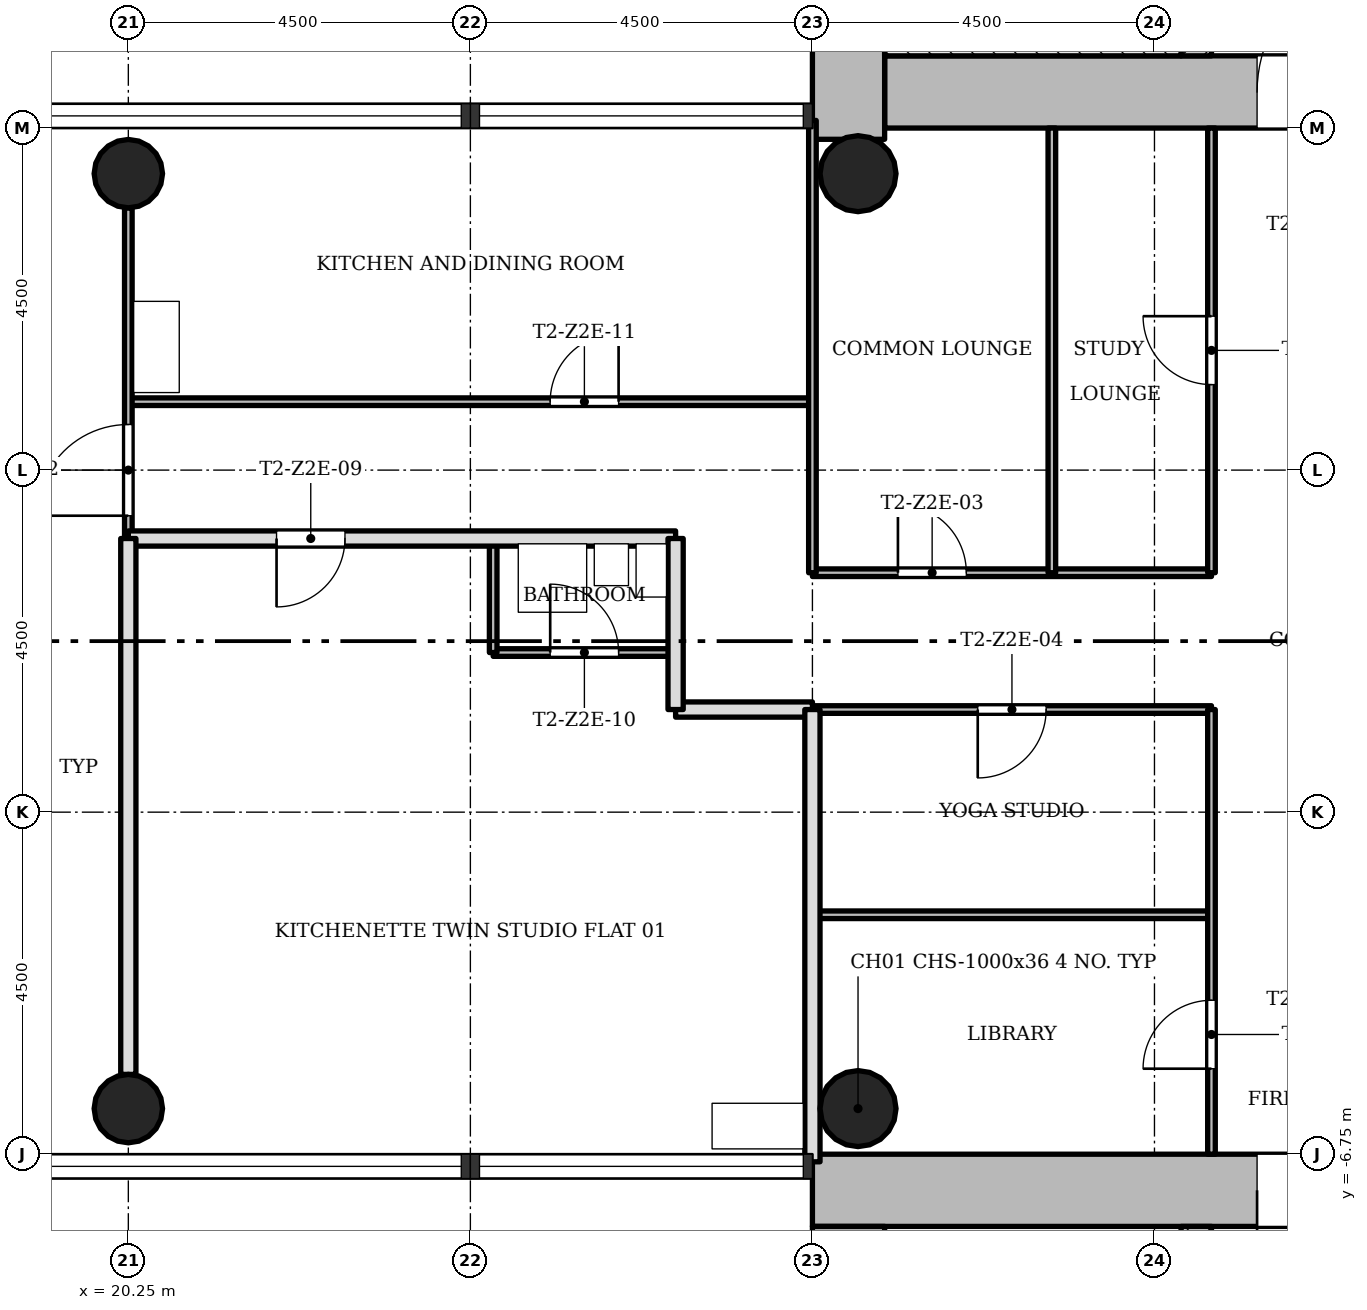
"""IFC4 building model, lengths in metres.
Left out: names, types, materials, properties, quantities, classifications, styles, units other than length and angle.
Written with IfcOpenShell. Run it as: python <this file> out.ifc"""

import sys

from ifc_helpers import new_model, si_unit, direction, frame, frame_2d, origin, origin_2d, place, context, subcontext, project, spatial, rectangle, hollow_circle, extrude, element, fill, save


model = new_model("IFC4")
c1 = context("Model", 3, precision=1e-05, world=origin(), true_north=direction((0.0, 1.0)))
c2 = subcontext(c1, "Body", "Model", "MODEL_VIEW")
j1 = project(units=[si_unit("LENGTHUNIT", "METRE"), si_unit("PLANEANGLEUNIT", "RADIAN")], contexts=[c1])
p1 = place(None, origin())
s1 = spatial("IfcSite", under=j1, at=p1, CompositionType="ELEMENT")
p2 = place(p1, origin())
s2 = spatial("IfcBuilding", under=s1, at=p2, CompositionType="ELEMENT")
p3 = place(p2, frame((0.0, 0.0, 97.0)))
s3 = spatial("IfcBuildingStorey", under=s2, at=p3, CompositionType="ELEMENT", Elevation=97.0)
p4 = place(p3, frame((30.2, 7.225, 0.0), z_axis=(0.0, 0.0, 1.0), x_axis=(1.0, 0.0, 0.0)))
e1 = element("IfcWall", 1, at=p4, inside=s3, PredefinedType="SHEAR", context=c2, shape_type="SweptSolid", body=[
    extrude(rectangle(XDim=12.55, YDim=0.95, at=frame_2d((6.275, 0.0))), origin(), (0.0, 0.0, 1.0), 3.4),
])
p5 = place(p4, frame((4.9, 0.0, 0.0)))
e2 = element("IfcOpeningElement", 2, at=p5, cuts=e1, PredefinedType="OPENING", context=c2, shape_type="SweptSolid", body=[
    extrude(rectangle(XDim=1.8, YDim=2.1, at=frame_2d((0.9, 1.05))), frame((0.0, 0.485, 0.0), z_axis=(0.0, -1.0, 0.0), x_axis=(1.0, 0.0, 0.0)), (0.0, 0.0, 1.0), 0.97),
])
p6 = place(p3, frame((29.725, 15.298, 0.0), z_axis=(0.0, 0.0, 1.0), x_axis=(0.0, -1.0, 0.0)))
e3 = element("IfcWall", 3, at=p6, inside=s3, PredefinedType="SHEAR", context=c2, shape_type="SweptSolid", body=[
    extrude(rectangle(XDim=8.696, YDim=0.95, at=frame_2d((4.348, 0.0))), origin(), (0.0, 0.0, 1.0), 3.4),
])
p7 = place(p3, frame((34.3, 7.7, 0.0), z_axis=(0.0, 0.0, 1.0), x_axis=(0.0, 1.0, 0.0)))
e4 = element("IfcWall", 4, at=p7, inside=s3, PredefinedType="SHEAR", context=c2, shape_type="SweptSolid", body=[
    extrude(rectangle(XDim=7.1, YDim=0.4, at=frame_2d((3.55, 0.0))), origin(), (0.0, 0.0, 1.0), 3.4),
])
p8 = place(p7, frame((0.7, 0.0, 0.0)))
e5 = element("IfcOpeningElement", 5, at=p8, cuts=e4, PredefinedType="OPENING", context=c2, shape_type="SweptSolid", body=[
    extrude(rectangle(XDim=0.9, YDim=2.1, at=frame_2d((0.45, 1.05))), frame((0.0, 0.21, 0.0), z_axis=(0.0, -1.0, 0.0), x_axis=(1.0, 0.0, 0.0)), (0.0, 0.0, 1.0), 0.42),
])
p9 = place(p3, frame((41.8, -7.225, 0.0), z_axis=(0.0, 0.0, 1.0), x_axis=(-1.0, 0.0, 0.0)))
e6 = element("IfcWall", 6, at=p9, inside=s3, PredefinedType="SHEAR", context=c2, shape_type="SweptSolid", body=[
    extrude(rectangle(XDim=12.55, YDim=0.95, at=frame_2d((6.275, 0.0))), origin(), (0.0, 0.0, 1.0), 3.4),
])
p10 = place(p9, frame((4.9, 0.0, 0.0)))
e7 = element("IfcOpeningElement", 7, at=p10, cuts=e6, PredefinedType="OPENING", context=c2, shape_type="SweptSolid", body=[
    extrude(rectangle(XDim=1.8, YDim=2.1, at=frame_2d((0.9, 1.05))), frame((0.0, 0.485, 0.0), z_axis=(0.0, -1.0, 0.0), x_axis=(1.0, 0.0, 0.0)), (0.0, 0.0, 1.0), 0.97),
])
p11 = place(p3, frame((29.725, -7.7, 0.0), z_axis=(0.0, 0.0, 1.0), x_axis=(0.0, -1.0, 0.0)))
e8 = element("IfcWall", 8, at=p11, inside=s3, PredefinedType="SHEAR", context=c2, shape_type="SweptSolid", body=[
    extrude(rectangle(XDim=8.05, YDim=0.95, at=frame_2d((4.025, 0.0))), origin(), (0.0, 0.0, 1.0), 3.4),
])
p12 = place(p3, frame((34.3, -14.8, 0.0), z_axis=(0.0, 0.0, 1.0), x_axis=(0.0, 1.0, 0.0)))
e9 = element("IfcWall", 9, at=p12, inside=s3, PredefinedType="SHEAR", context=c2, shape_type="SweptSolid", body=[
    extrude(rectangle(XDim=7.1, YDim=0.4, at=frame_2d((3.55, 0.0))), origin(), (0.0, 0.0, 1.0), 3.4),
])
p13 = place(p12, frame((5.2, 0.0, 0.0)))
e10 = element("IfcOpeningElement", 10, at=p13, cuts=e9, PredefinedType="OPENING", context=c2, shape_type="SweptSolid", body=[
    extrude(rectangle(XDim=1.1, YDim=2.1, at=frame_2d((0.55, 1.05))), frame((0.0, 0.21, 0.0), z_axis=(0.0, -1.0, 0.0), x_axis=(1.0, 0.0, 0.0)), (0.0, 0.0, 1.0), 0.42),
])
for number, where, z_axis, x_axis in (
    (11, (20.25, 6.15, 0.0), (0.0, 0.0, 1.0), (1.0, 0.0, 0.0)),
    (12, (20.25, -6.15, 0.0), (0.0, 0.0, 1.0), (1.0, 0.0, 0.0)),
):
    element("IfcColumn", number, at=place(p3, frame(where, z_axis=z_axis, x_axis=x_axis)), inside=s3, PredefinedType="COLUMN", context=c2, shape_type="SweptSolid", body=[
        extrude(hollow_circle(Radius=0.45, WallThickness=0.032, at=origin_2d()), origin(), (0.0, 0.0, 1.0), 3.4),
    ])
for number, where, z_axis, x_axis in (
    (13, (29.85, 6.15, 0.0), (0.0, 0.0, 1.0), (1.0, 0.0, 0.0)),
    (14, (29.85, -6.15, 0.0), (0.0, 0.0, 1.0), (1.0, 0.0, 0.0)),
):
    element("IfcColumn", number, at=place(p3, frame(where, z_axis=z_axis, x_axis=x_axis)), inside=s3, PredefinedType="COLUMN", context=c2, shape_type="SweptSolid", body=[
        extrude(hollow_circle(Radius=0.5, WallThickness=0.036, at=origin_2d()), origin(), (0.0, 0.0, 1.0), 3.4),
    ])
p14 = place(p3, frame((34.5, -3.6, 0.0), z_axis=(0.0, 0.0, 1.0), x_axis=(-1.0, 0.0, 0.0)))
e15 = element("IfcWall", 15, at=p14, inside=s3, PredefinedType="PARTITIONING", context=c2, shape_type="SweptSolid", body=[
    extrude(rectangle(XDim=5.25, YDim=0.1, at=frame_2d((2.625, 0.0))), origin(), (0.0, 0.0, 1.0), 3.0),
])
p15 = place(p3, frame((34.5, -0.9, 0.0), z_axis=(0.0, 0.0, 1.0), x_axis=(-1.0, 0.0, 0.0)))
e16 = element("IfcWall", 16, at=p15, inside=s3, PredefinedType="PARTITIONING", context=c2, shape_type="SweptSolid", body=[
    extrude(rectangle(XDim=5.25, YDim=0.1, at=frame_2d((2.625, 0.0))), origin(), (0.0, 0.0, 1.0), 3.0),
])
p16 = place(p15, frame((2.175, 0.0, 0.0)))
e17 = element("IfcOpeningElement", 17, at=p16, cuts=e16, PredefinedType="OPENING", context=c2, shape_type="SweptSolid", body=[
    extrude(rectangle(XDim=0.9, YDim=2.1, at=frame_2d((0.45, 1.05))), frame((0.0, 0.06, 0.0), z_axis=(0.0, -1.0, 0.0), x_axis=(1.0, 0.0, 0.0)), (0.0, 0.0, 1.0), 0.12),
])
p17 = place(p3, frame((29.25, -0.9, 0.0), z_axis=(0.0, 0.0, 1.0), x_axis=(-1.0, 0.0, 0.0)))
e18 = element("IfcWall", 18, at=p17, inside=s3, PredefinedType="SOLIDWALL", context=c2, shape_type="SweptSolid", body=[
    extrude(rectangle(XDim=1.8, YDim=0.2, at=frame_2d((0.9, 0.0))), origin(), (0.0, 0.0, 1.0), 3.0),
])
p18 = place(p3, frame((27.45, -0.15, 0.0), z_axis=(0.0, 0.0, 1.0), x_axis=(-1.0, 0.0, 0.0)))
e19 = element("IfcWall", 19, at=p18, inside=s3, PredefinedType="PARTITIONING", context=c2, shape_type="SweptSolid", body=[
    extrude(rectangle(XDim=2.4, YDim=0.1, at=frame_2d((1.2, 0.0))), origin(), (0.0, 0.0, 1.0), 3.0),
])
p19 = place(p18, frame((0.75, 0.0, 0.0)))
e20 = element("IfcOpeningElement", 20, at=p19, cuts=e19, PredefinedType="OPENING", context=c2, shape_type="SweptSolid", body=[
    extrude(rectangle(XDim=0.9, YDim=2.1, at=frame_2d((0.45, 1.05))), frame((0.0, 0.06, 0.0), z_axis=(0.0, -1.0, 0.0), x_axis=(1.0, 0.0, 0.0)), (0.0, 0.0, 1.0), 0.12),
])
p20 = place(p3, frame((34.5, 0.9, 0.0), z_axis=(0.0, 0.0, 1.0), x_axis=(-1.0, 0.0, 0.0)))
e21 = element("IfcWall", 21, at=p20, inside=s3, PredefinedType="PARTITIONING", context=c2, shape_type="SweptSolid", body=[
    extrude(rectangle(XDim=5.25, YDim=0.1, at=frame_2d((2.625, 0.0))), origin(), (0.0, 0.0, 1.0), 3.0),
])
p21 = place(p20, frame((3.225, 0.0, 0.0)))
e22 = element("IfcOpeningElement", 22, at=p21, cuts=e21, PredefinedType="OPENING", context=c2, shape_type="SweptSolid", body=[
    extrude(rectangle(XDim=0.9, YDim=2.1, at=frame_2d((0.45, 1.05))), frame((0.0, 0.06, 0.0), z_axis=(0.0, -1.0, 0.0), x_axis=(1.0, 0.0, 0.0)), (0.0, 0.0, 1.0), 0.12),
])
p22 = place(p3, frame((27.45, 1.35, 0.0), z_axis=(0.0, 0.0, 1.0), x_axis=(-1.0, 0.0, 0.0)))
e23 = element("IfcWall", 23, at=p22, inside=s3, PredefinedType="SOLIDWALL", context=c2, shape_type="SweptSolid", body=[
    extrude(rectangle(XDim=7.2, YDim=0.2, at=frame_2d((3.6, 0.0))), origin(), (0.0, 0.0, 1.0), 3.0),
])
p23 = place(p22, frame((4.35, 0.0, 0.0)))
e24 = element("IfcOpeningElement", 24, at=p23, cuts=e23, PredefinedType="OPENING", context=c2, shape_type="SweptSolid", body=[
    extrude(rectangle(XDim=0.9, YDim=2.1, at=frame_2d((0.45, 1.05))), frame((0.0, 0.11, 0.0), z_axis=(0.0, -1.0, 0.0), x_axis=(1.0, 0.0, 0.0)), (0.0, 0.0, 1.0), 0.22),
])
p24 = place(p3, frame((29.25, 3.15, 0.0), z_axis=(0.0, 0.0, 1.0), x_axis=(-1.0, 0.0, 0.0)))
e25 = element("IfcWall", 25, at=p24, inside=s3, PredefinedType="PARTITIONING", context=c2, shape_type="SweptSolid", body=[
    extrude(rectangle(XDim=9.0, YDim=0.1, at=frame_2d((4.5, 0.0))), origin(), (0.0, 0.0, 1.0), 3.0),
])
p25 = place(p24, frame((2.55, 0.0, 0.0)))
e26 = element("IfcOpeningElement", 26, at=p25, cuts=e25, PredefinedType="OPENING", context=c2, shape_type="SweptSolid", body=[
    extrude(rectangle(XDim=0.9, YDim=2.1, at=frame_2d((0.45, 1.05))), frame((0.0, 0.06, 0.0), z_axis=(0.0, -1.0, 0.0), x_axis=(1.0, 0.0, 0.0)), (0.0, 0.0, 1.0), 0.12),
])
p26 = place(p3, frame((34.5, -6.75, 0.0), z_axis=(0.0, 0.0, 1.0), x_axis=(0.0, 1.0, 0.0)))
e27 = element("IfcWall", 27, at=p26, inside=s3, PredefinedType="PARTITIONING", context=c2, shape_type="SweptSolid", body=[
    extrude(rectangle(XDim=5.85, YDim=0.1, at=frame_2d((2.925, 0.0))), origin(), (0.0, 0.0, 1.0), 3.0),
])
p27 = place(p26, frame((1.125, 0.0, 0.0)))
e28 = element("IfcOpeningElement", 28, at=p27, cuts=e27, PredefinedType="OPENING", context=c2, shape_type="SweptSolid", body=[
    extrude(rectangle(XDim=0.9, YDim=2.1, at=frame_2d((0.45, 1.05))), frame((0.0, 0.06, 0.0), z_axis=(0.0, -1.0, 0.0), x_axis=(1.0, 0.0, 0.0)), (0.0, 0.0, 1.0), 0.12),
])
p28 = place(p3, frame((34.5, 0.9, 0.0), z_axis=(0.0, 0.0, 1.0), x_axis=(0.0, 1.0, 0.0)))
e29 = element("IfcWall", 29, at=p28, inside=s3, PredefinedType="PARTITIONING", context=c2, shape_type="SweptSolid", body=[
    extrude(rectangle(XDim=5.85, YDim=0.1, at=frame_2d((2.925, 0.0))), origin(), (0.0, 0.0, 1.0), 3.0),
])
p29 = place(p28, frame((2.475, 0.0, 0.0)))
e30 = element("IfcOpeningElement", 30, at=p29, cuts=e29, PredefinedType="OPENING", context=c2, shape_type="SweptSolid", body=[
    extrude(rectangle(XDim=0.9, YDim=2.1, at=frame_2d((0.45, 1.05))), frame((0.0, 0.06, 0.0), z_axis=(0.0, -1.0, 0.0), x_axis=(1.0, 0.0, 0.0)), (0.0, 0.0, 1.0), 0.12),
])
p30 = place(p3, frame((32.4, 0.9, 0.0), z_axis=(0.0, 0.0, 1.0), x_axis=(0.0, 1.0, 0.0)))
e31 = element("IfcWall", 31, at=p30, inside=s3, PredefinedType="PARTITIONING", context=c2, shape_type="SweptSolid", body=[
    extrude(rectangle(XDim=5.85, YDim=0.1, at=frame_2d((2.925, 0.0))), origin(), (0.0, 0.0, 1.0), 3.0),
])
p31 = place(p3, frame((29.25, 0.9, 0.0), z_axis=(0.0, 0.0, 1.0), x_axis=(0.0, 1.0, 0.0)))
e32 = element("IfcWall", 32, at=p31, inside=s3, PredefinedType="PARTITIONING", context=c2, shape_type="SweptSolid", body=[
    extrude(rectangle(XDim=5.95, YDim=0.1, at=frame_2d((2.975, 0.0))), origin(), (0.0, 0.0, 1.0), 3.0),
])
p32 = place(p3, frame((29.25, -6.85, 0.0), z_axis=(0.0, 0.0, 1.0), x_axis=(0.0, 1.0, 0.0)))
e33 = element("IfcWall", 33, at=p32, inside=s3, PredefinedType="SOLIDWALL", context=c2, shape_type="SweptSolid", body=[
    extrude(rectangle(XDim=5.95, YDim=0.2, at=frame_2d((2.975, 0.0))), origin(), (0.0, 0.0, 1.0), 3.0),
])
p33 = place(p3, frame((27.45, -0.9, 0.0), z_axis=(0.0, 0.0, 1.0), x_axis=(0.0, 1.0, 0.0)))
e34 = element("IfcWall", 34, at=p33, inside=s3, PredefinedType="SOLIDWALL", context=c2, shape_type="SweptSolid", body=[
    extrude(rectangle(XDim=2.25, YDim=0.2, at=frame_2d((1.125, 0.0))), origin(), (0.0, 0.0, 1.0), 3.0),
])
p34 = place(p3, frame((25.05, -0.15, 0.0), z_axis=(0.0, 0.0, 1.0), x_axis=(0.0, 1.0, 0.0)))
e35 = element("IfcWall", 35, at=p34, inside=s3, PredefinedType="PARTITIONING", context=c2, shape_type="SweptSolid", body=[
    extrude(rectangle(XDim=1.5, YDim=0.1, at=frame_2d((0.75, 0.0))), origin(), (0.0, 0.0, 1.0), 3.0),
])
p35 = place(p3, frame((20.25, 1.35, 0.0), z_axis=(0.0, 0.0, 1.0), x_axis=(0.0, 1.0, 0.0)))
e36 = element("IfcWall", 36, at=p35, inside=s3, PredefinedType="PARTITIONING", context=c2, shape_type="SweptSolid", body=[
    extrude(rectangle(XDim=4.35, YDim=0.1, at=frame_2d((2.175, 0.0))), origin(), (0.0, 0.0, 1.0), 3.0),
])
p36 = place(p35, frame((0.3, 0.0, 0.0)))
e37 = element("IfcOpeningElement", 37, at=p36, cuts=e36, PredefinedType="OPENING", context=c2, shape_type="SweptSolid", body=[
    extrude(rectangle(XDim=1.2, YDim=2.1, at=frame_2d((0.6, 1.05))), frame((0.0, 0.06, 0.0), z_axis=(0.0, -1.0, 0.0), x_axis=(1.0, 0.0, 0.0)), (0.0, 0.0, 1.0), 0.12),
])
p37 = place(p3, frame((20.25, -5.7, 0.0), z_axis=(0.0, 0.0, 1.0), x_axis=(0.0, 1.0, 0.0)))
e38 = element("IfcWall", 38, at=p37, inside=s3, PredefinedType="SOLIDWALL", context=c2, shape_type="SweptSolid", body=[
    extrude(rectangle(XDim=7.05, YDim=0.2, at=frame_2d((3.525, 0.0))), origin(), (0.0, 0.0, 1.0), 3.0),
])
p38 = place(p3, frame((34.1, 7.825, 0.0), z_axis=(0.0, 0.0, 1.0), x_axis=(-1.0, 0.0, 0.0)))
e39 = element("IfcWall", 39, at=p38, inside=s3, PredefinedType="SHEAR", context=c2, shape_type="SweptSolid", body=[
    extrude(rectangle(XDim=3.9, YDim=0.25, at=frame_2d((1.95, 0.0))), origin(), (0.0, 0.0, 1.0), 3.4),
])
p39 = place(p29, origin())
e40 = element("IfcDoor", 40, at=p39, inside=s3, OperationType="SINGLE_SWING_LEFT", PredefinedType="DOOR", context=c2, shape_type="SweptSolid", body=[
    extrude(rectangle(XDim=0.9, YDim=2.1, at=frame_2d((0.45, 1.05))), frame((0.0, 0.025, 0.0), z_axis=(0.0, -1.0, 0.0), x_axis=(1.0, 0.0, 0.0)), (0.0, 0.0, 1.0), 0.05),
])
fill(e30, e40)
p40 = place(p21, origin())
e41 = element("IfcDoor", 41, at=p40, inside=s3, OperationType="SINGLE_SWING_RIGHT", PredefinedType="DOOR", context=c2, shape_type="SweptSolid", body=[
    extrude(rectangle(XDim=0.9, YDim=2.1, at=frame_2d((0.45, 1.05))), frame((0.0, 0.025, 0.0), z_axis=(0.0, -1.0, 0.0), x_axis=(1.0, 0.0, 0.0)), (0.0, 0.0, 1.0), 0.05),
])
fill(e22, e41)
p41 = place(p16, origin())
e42 = element("IfcDoor", 42, at=p41, inside=s3, OperationType="SINGLE_SWING_LEFT", PredefinedType="DOOR", context=c2, shape_type="SweptSolid", body=[
    extrude(rectangle(XDim=0.9, YDim=2.1, at=frame_2d((0.45, 1.05))), frame((0.0, 0.025, 0.0), z_axis=(0.0, -1.0, 0.0), x_axis=(1.0, 0.0, 0.0)), (0.0, 0.0, 1.0), 0.05),
])
fill(e17, e42)
p42 = place(p27, origin())
e43 = element("IfcDoor", 43, at=p42, inside=s3, OperationType="SINGLE_SWING_RIGHT", PredefinedType="DOOR", context=c2, shape_type="SweptSolid", body=[
    extrude(rectangle(XDim=0.9, YDim=2.1, at=frame_2d((0.45, 1.05))), frame((0.0, 0.025, 0.0), z_axis=(0.0, -1.0, 0.0), x_axis=(1.0, 0.0, 0.0)), (0.0, 0.0, 1.0), 0.05),
])
fill(e28, e43)
p43 = place(p23, origin())
e44 = element("IfcDoor", 44, at=p43, inside=s3, OperationType="SINGLE_SWING_LEFT", PredefinedType="DOOR", context=c2, shape_type="SweptSolid", body=[
    extrude(rectangle(XDim=0.9, YDim=2.1, at=frame_2d((0.45, 1.05))), frame((0.0, 0.025, 0.0), z_axis=(0.0, -1.0, 0.0), x_axis=(1.0, 0.0, 0.0)), (0.0, 0.0, 1.0), 0.05),
])
fill(e24, e44)
p44 = place(p19, origin())
e45 = element("IfcDoor", 45, at=p44, inside=s3, OperationType="SINGLE_SWING_RIGHT", PredefinedType="DOOR", context=c2, shape_type="SweptSolid", body=[
    extrude(rectangle(XDim=0.9, YDim=2.1, at=frame_2d((0.45, 1.05))), frame((0.0, 0.025, 0.0), z_axis=(0.0, -1.0, 0.0), x_axis=(1.0, 0.0, 0.0)), (0.0, 0.0, 1.0), 0.05),
])
fill(e20, e45)
p45 = place(p25, origin())
e46 = element("IfcDoor", 46, at=p45, inside=s3, OperationType="SINGLE_SWING_LEFT", PredefinedType="DOOR", context=c2, shape_type="SweptSolid", body=[
    extrude(rectangle(XDim=0.9, YDim=2.1, at=frame_2d((0.45, 1.05))), frame((0.0, 0.025, 0.0), z_axis=(0.0, -1.0, 0.0), x_axis=(1.0, 0.0, 0.0)), (0.0, 0.0, 1.0), 0.05),
])
fill(e26, e46)
p46 = place(p36, origin())
e47 = element("IfcDoor", 47, at=p46, inside=s3, OperationType="SINGLE_SWING_RIGHT", PredefinedType="DOOR", context=c2, shape_type="SweptSolid", body=[
    extrude(rectangle(XDim=1.2, YDim=2.1, at=frame_2d((0.6, 1.05))), frame((0.0, 0.025, 0.0), z_axis=(0.0, -1.0, 0.0), x_axis=(1.0, 0.0, 0.0)), (0.0, 0.0, 1.0), 0.05),
])
fill(e37, e47)
p47 = place(p5, origin())
e48 = element("IfcDoor", 48, at=p47, inside=s3, OperationType="SINGLE_SWING_LEFT", PredefinedType="DOOR", context=c2, shape_type="SweptSolid", body=[
    extrude(rectangle(XDim=1.8, YDim=2.1, at=frame_2d((0.9, 1.05))), frame((0.0, 0.025, 0.0), z_axis=(0.0, -1.0, 0.0), x_axis=(1.0, 0.0, 0.0)), (0.0, 0.0, 1.0), 0.05),
])
fill(e2, e48)
p48 = place(p10, origin())
e49 = element("IfcDoor", 49, at=p48, inside=s3, OperationType="SINGLE_SWING_LEFT", PredefinedType="DOOR", context=c2, shape_type="SweptSolid", body=[
    extrude(rectangle(XDim=1.8, YDim=2.1, at=frame_2d((0.9, 1.05))), frame((0.0, 0.025, 0.0), z_axis=(0.0, -1.0, 0.0), x_axis=(1.0, 0.0, 0.0)), (0.0, 0.0, 1.0), 0.05),
])
fill(e7, e49)
save(model, sys.argv[1])
